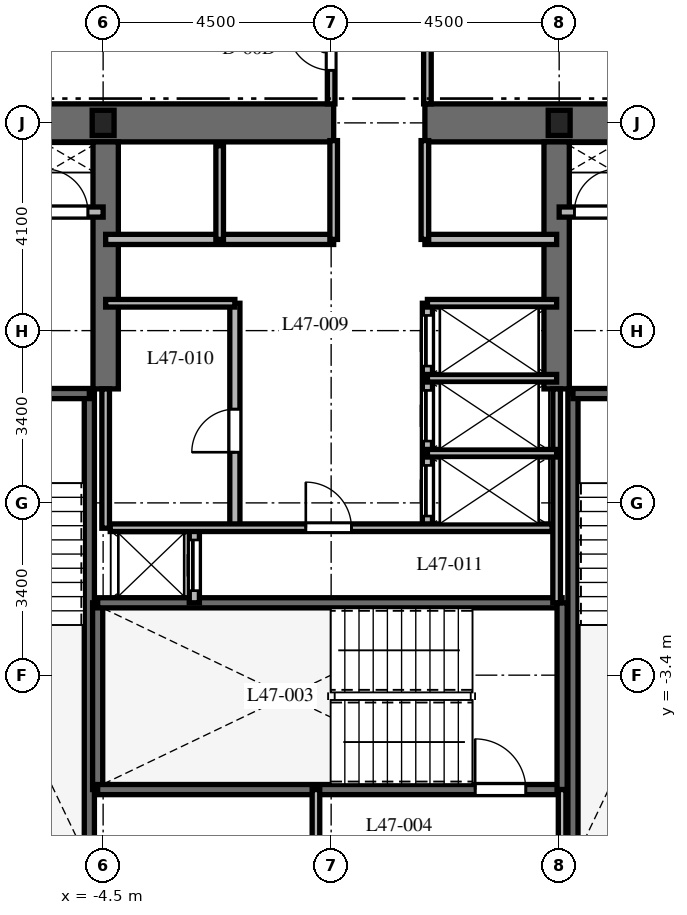
"""IFC4 building model, lengths in metres.
Left out: names, types, materials, properties, quantities, classifications, styles, units other than length and angle.
Written with IfcOpenShell. Run it as: python <this file> out.ifc"""

import sys

from ifc_helpers import new_model, si_unit, direction, frame, frame_2d, origin, origin_2d, place, context, subcontext, project, spatial, rectangle, i_section, extrude, element, fill, save


model = new_model("IFC4")
c1 = context("Model", 3, precision=1e-05, world=origin(), true_north=direction((0.0, 1.0)))
c2 = subcontext(c1, "Body", "Model", "MODEL_VIEW")
j1 = project(units=[si_unit("LENGTHUNIT", "METRE"), si_unit("PLANEANGLEUNIT", "RADIAN")], contexts=[c1])
p1 = place(None, origin())
s1 = spatial("IfcSite", under=j1, at=p1, CompositionType="ELEMENT")
p2 = place(p1, origin())
s2 = spatial("IfcBuilding", under=s1, at=p2, CompositionType="ELEMENT")
p3 = place(p2, frame((0.0, 0.0, 190.4)))
s3 = spatial("IfcBuildingStorey", under=s2, at=p3, CompositionType="ELEMENT", Elevation=190.4)
p4 = place(p3, frame((-9.375, 7.5, 0.0), z_axis=(0.0, 0.0, 1.0), x_axis=(1.0, 0.0, 0.0)))
e1 = element("IfcWall", 1, at=p4, inside=s3, PredefinedType="SHEAR", context=c2, shape_type="SweptSolid", body=[
    extrude(rectangle(XDim=9.425, YDim=0.75, at=frame_2d((4.712, 0.0))), origin(), (0.0, 0.0, 1.0), 3.7),
])
p5 = place(p3, frame((1.85, 7.5, 0.0), z_axis=(0.0, 0.0, 1.0), x_axis=(1.0, 0.0, 0.0)))
e2 = element("IfcWall", 2, at=p5, inside=s3, PredefinedType="SHEAR", context=c2, shape_type="SweptSolid", body=[
    extrude(rectangle(XDim=7.525, YDim=0.75, at=frame_2d((3.762, 0.0))), origin(), (0.0, 0.0, 1.0), 3.7),
])
for number, where, z_axis, x_axis in (
    (3, (-4.45, 2.25, 0.0), (0.0, 0.0, 1.0), (0.0, 1.0, 0.0)),
    (4, (4.45, 2.25, 0.0), (0.0, 0.0, 1.0), (0.0, 1.0, 0.0)),
):
    element("IfcWall", number, at=place(p3, frame(where, z_axis=z_axis, x_axis=x_axis)), inside=s3, PredefinedType="SHEAR", context=c2, shape_type="SweptSolid", body=[
        extrude(rectangle(XDim=4.875, YDim=0.5, at=frame_2d((2.438, 0.0))), origin(), (0.0, 0.0, 1.0), 3.7),
    ])
p6 = place(p3, frame((-4.772, -6.985, 0.0), z_axis=(0.0, 0.0, 1.0), x_axis=(0.0, 1.0, 0.0)))
e5 = element("IfcWall", 5, at=p6, inside=s3, PredefinedType="SHEAR", context=c2, shape_type="SweptSolid", body=[
    extrude(rectangle(XDim=9.143, YDim=0.2, at=frame_2d((4.572, 0.0))), origin(), (0.0, 0.0, 1.0), 3.7),
])
p7 = place(p3, frame((-8.458, 2.158, 0.0), z_axis=(0.0, 0.0, 1.0), x_axis=(1.0, 0.0, 0.0)))
e6 = element("IfcWall", 6, at=p7, inside=s3, PredefinedType="SHEAR", context=c2, shape_type="SweptSolid", body=[
    extrude(rectangle(XDim=3.686, YDim=0.2, at=frame_2d((1.843, 0.0))), origin(), (0.0, 0.0, 1.0), 3.7),
])
p8 = place(p7, frame((1.3, 0.0, 0.0)))
e7 = element("IfcOpeningElement", 7, at=p8, cuts=e6, PredefinedType="OPENING", context=c2, shape_type="SweptSolid", body=[
    extrude(rectangle(XDim=1.0, YDim=2.15, at=frame_2d((0.5, 1.075))), frame((0.0, 0.11, 0.0), z_axis=(0.0, -1.0, 0.0), x_axis=(1.0, 0.0, 0.0)), (0.0, 0.0, 1.0), 0.22),
])
p9 = place(p3, frame((4.772, -6.985, 0.0), z_axis=(0.0, 0.0, 1.0), x_axis=(0.0, 1.0, 0.0)))
e8 = element("IfcWall", 8, at=p9, inside=s3, PredefinedType="SHEAR", context=c2, shape_type="SweptSolid", body=[
    extrude(rectangle(XDim=9.143, YDim=0.2, at=frame_2d((4.572, 0.0))), origin(), (0.0, 0.0, 1.0), 3.7),
])
p10 = place(p3, frame((4.772, 2.158, 0.0), z_axis=(0.0, 0.0, 1.0), x_axis=(1.0, 0.0, 0.0)))
e9 = element("IfcWall", 9, at=p10, inside=s3, PredefinedType="SHEAR", context=c2, shape_type="SweptSolid", body=[
    extrude(rectangle(XDim=3.686, YDim=0.2, at=frame_2d((1.843, 0.0))), origin(), (0.0, 0.0, 1.0), 3.7),
])
p11 = place(p10, frame((1.35, 0.0, 0.0)))
e10 = element("IfcOpeningElement", 10, at=p11, cuts=e9, PredefinedType="OPENING", context=c2, shape_type="SweptSolid", body=[
    extrude(rectangle(XDim=1.0, YDim=2.15, at=frame_2d((0.5, 1.075))), frame((0.0, 0.11, 0.0), z_axis=(0.0, -1.0, 0.0), x_axis=(1.0, 0.0, 0.0)), (0.0, 0.0, 1.0), 0.22),
])
p12 = place(p3, frame((-4.608, -5.658, 0.0), z_axis=(0.0, 0.0, 1.0), x_axis=(0.0, 1.0, 0.0)))
e11 = element("IfcWall", 11, at=p12, inside=s3, PredefinedType="SHEAR", context=c2, shape_type="SweptSolid", body=[
    extrude(rectangle(XDim=3.686, YDim=0.2, at=frame_2d((1.843, 0.0))), origin(), (0.0, 0.0, 1.0), 3.7),
])
p13 = place(p3, frame((-4.608, -5.658, 0.0), z_axis=(0.0, 0.0, 1.0), x_axis=(1.0, 0.0, 0.0)))
e12 = element("IfcWall", 12, at=p13, inside=s3, PredefinedType="SHEAR", context=c2, shape_type="SweptSolid", body=[
    extrude(rectangle(XDim=9.166, YDim=0.2, at=frame_2d((4.583, 0.0))), origin(), (0.0, 0.0, 1.0), 3.7),
])
p14 = place(p13, frame((7.45, 0.0, 0.0)))
e13 = element("IfcOpeningElement", 13, at=p14, cuts=e12, PredefinedType="OPENING", context=c2, shape_type="SweptSolid", body=[
    extrude(rectangle(XDim=1.0, YDim=2.15, at=frame_2d((0.5, 1.075))), frame((0.0, 0.11, 0.0), z_axis=(0.0, -1.0, 0.0), x_axis=(1.0, 0.0, 0.0)), (0.0, 0.0, 1.0), 0.22),
])
p15 = place(p3, frame((-4.608, -1.972, 0.0), z_axis=(0.0, 0.0, 1.0), x_axis=(1.0, 0.0, 0.0)))
e14 = element("IfcWall", 14, at=p15, inside=s3, PredefinedType="SHEAR", context=c2, shape_type="SweptSolid", body=[
    extrude(rectangle(XDim=9.166, YDim=0.2, at=frame_2d((4.583, 0.0))), origin(), (0.0, 0.0, 1.0), 3.7),
])
p16 = place(p3, frame((4.558, -5.658, 0.0), z_axis=(0.0, 0.0, 1.0), x_axis=(0.0, 1.0, 0.0)))
e15 = element("IfcWall", 15, at=p16, inside=s3, PredefinedType="SHEAR", context=c2, shape_type="SweptSolid", body=[
    extrude(rectangle(XDim=3.686, YDim=0.2, at=frame_2d((1.843, 0.0))), origin(), (0.0, 0.0, 1.0), 3.7),
])
for number, where, z_axis, x_axis in (
    (16, (4.5, 7.5, 0.0), (0.0, 0.0, 1.0), (1.0, 0.0, 0.0)),
    (17, (-4.5, 7.5, 0.0), (0.0, 0.0, 1.0), (1.0, 0.0, 0.0)),
):
    element("IfcColumn", number, at=place(p3, frame(where, z_axis=z_axis, x_axis=x_axis)), inside=s3, PredefinedType="COLUMN", context=c2, shape_type="SweptSolid", body=[
        extrude(i_section(OverallWidth=0.432, OverallDepth=0.498, WebThickness=0.056, FlangeThickness=0.089, at=origin_2d()), origin(), (0.0, 0.0, 1.0), 3.7),
    ])
for number, where, z_axis, x_axis in (
    (18, (-0.3, -7.02, 0.0), (0.0, 0.0, 1.0), (0.0, 1.0, 0.0)),
    (19, (4.558, -7.02, 0.0), (0.0, 0.0, 1.0), (0.0, 1.0, 0.0)),
):
    element("IfcWall", number, at=place(p3, frame(where, z_axis=z_axis, x_axis=x_axis)), inside=s3, PredefinedType="PARTITIONING", context=c2, shape_type="SweptSolid", body=[
        extrude(rectangle(XDim=1.362, YDim=0.15, at=frame_2d((0.681, 0.0))), origin(), (0.0, 0.0, 1.0), 3.4),
    ])
p17 = place(p3, frame((-8.55, 5.74, 0.0), z_axis=(0.0, 0.0, 1.0), x_axis=(1.0, 0.0, 0.0)))
e20 = element("IfcWall", 20, at=p17, inside=s3, PredefinedType="PARTITIONING", context=c2, shape_type="SweptSolid", body=[
    extrude(rectangle(XDim=4.05, YDim=0.2, at=frame_2d((2.025, 0.0))), origin(), (0.0, 0.0, 1.0), 3.4),
])
p18 = place(p17, frame((0.75, 0.0, 0.0)))
e21 = element("IfcOpeningElement", 21, at=p18, cuts=e20, PredefinedType="OPENING", context=c2, shape_type="SweptSolid", body=[
    extrude(rectangle(XDim=1.1, YDim=2.2, at=frame_2d((0.55, 1.1))), frame((0.0, 0.11, 0.0), z_axis=(0.0, -1.0, 0.0), x_axis=(1.0, 0.0, 0.0)), (0.0, 0.0, 1.0), 0.22),
])
p19 = place(p17, frame((2.9, 0.0, 0.0)))
e22 = element("IfcOpeningElement", 22, at=p19, cuts=e20, PredefinedType="OPENING", context=c2, shape_type="SweptSolid", body=[
    extrude(rectangle(XDim=0.85, YDim=2.03, at=frame_2d((0.425, 1.015))), frame((0.0, 0.11, 0.0), z_axis=(0.0, -1.0, 0.0), x_axis=(1.0, 0.0, 0.0)), (0.0, 0.0, 1.0), 0.22),
])
p20 = place(p3, frame((4.5, 5.74, 0.0), z_axis=(0.0, 0.0, 1.0), x_axis=(1.0, 0.0, 0.0)))
e23 = element("IfcWall", 23, at=p20, inside=s3, PredefinedType="PARTITIONING", context=c2, shape_type="SweptSolid", body=[
    extrude(rectangle(XDim=4.05, YDim=0.2, at=frame_2d((2.025, 0.0))), origin(), (0.0, 0.0, 1.0), 3.4),
])
p21 = place(p20, frame((0.3, 0.0, 0.0)))
e24 = element("IfcOpeningElement", 24, at=p21, cuts=e23, PredefinedType="OPENING", context=c2, shape_type="SweptSolid", body=[
    extrude(rectangle(XDim=0.85, YDim=2.03, at=frame_2d((0.425, 1.015))), frame((0.0, 0.11, 0.0), z_axis=(0.0, -1.0, 0.0), x_axis=(1.0, 0.0, 0.0)), (0.0, 0.0, 1.0), 0.22),
])
p22 = place(p20, frame((2.15, 0.0, 0.0)))
e25 = element("IfcOpeningElement", 25, at=p22, cuts=e23, PredefinedType="OPENING", context=c2, shape_type="SweptSolid", body=[
    extrude(rectangle(XDim=1.1, YDim=2.2, at=frame_2d((0.55, 1.1))), frame((0.0, 0.11, 0.0), z_axis=(0.0, -1.0, 0.0), x_axis=(1.0, 0.0, 0.0)), (0.0, 0.0, 1.0), 0.22),
])
p23 = place(p3, frame((-2.7, -1.972, 0.0), z_axis=(0.0, 0.0, 1.0), x_axis=(0.0, 1.0, 0.0)))
e26 = element("IfcWall", 26, at=p23, inside=s3, PredefinedType="PARTITIONING", context=c2, shape_type="SweptSolid", body=[
    extrude(rectangle(XDim=1.472, YDim=0.2, at=frame_2d((0.736, 0.0))), origin(), (0.0, 0.0, 1.0), 3.4),
])
p24 = place(p23, frame((0.24, 0.0, 0.0)))
e27 = element("IfcOpeningElement", 27, at=p24, cuts=e26, PredefinedType="OPENING", context=c2, shape_type="SweptSolid", body=[
    extrude(rectangle(XDim=1.0, YDim=2.2, at=frame_2d((0.5, 1.1))), frame((0.0, 0.11, 0.0), z_axis=(0.0, -1.0, 0.0), x_axis=(1.0, 0.0, 0.0)), (0.0, 0.0, 1.0), 0.22),
])
p25 = place(p3, frame((-4.45, 5.2, 0.0), z_axis=(0.0, 0.0, 1.0), x_axis=(1.0, 0.0, 0.0)))
e28 = element("IfcWall", 28, at=p25, inside=s3, PredefinedType="PARTITIONING", context=c2, shape_type="SweptSolid", body=[
    extrude(rectangle(XDim=4.5, YDim=0.2, at=frame_2d((2.25, 0.0))), origin(), (0.0, 0.0, 1.0), 3.4),
])
p26 = place(p3, frame((1.85, 5.2, 0.0), z_axis=(0.0, 0.0, 1.0), x_axis=(1.0, 0.0, 0.0)))
e29 = element("IfcWall", 29, at=p26, inside=s3, PredefinedType="PARTITIONING", context=c2, shape_type="SweptSolid", body=[
    extrude(rectangle(XDim=2.6, YDim=0.2, at=frame_2d((1.3, 0.0))), origin(), (0.0, 0.0, 1.0), 3.4),
])
p27 = place(p3, frame((-2.2, 5.2, 0.0), z_axis=(0.0, 0.0, 1.0), x_axis=(0.0, 1.0, 0.0)))
e30 = element("IfcWall", 30, at=p27, inside=s3, PredefinedType="PARTITIONING", context=c2, shape_type="SweptSolid", body=[
    extrude(rectangle(XDim=1.85, YDim=0.15, at=frame_2d((0.925, 0.0))), origin(), (0.0, 0.0, 1.0), 3.4),
])
for number, where, z_axis, x_axis in (
    (31, (0.05, 5.2, 0.0), (0.0, 0.0, 1.0), (0.0, 1.0, 0.0)),
    (32, (1.85, 5.2, 0.0), (0.0, 0.0, 1.0), (0.0, 1.0, 0.0)),
):
    element("IfcWall", number, at=place(p3, frame(where, z_axis=z_axis, x_axis=x_axis)), inside=s3, PredefinedType="PARTITIONING", context=c2, shape_type="SweptSolid", body=[
        extrude(rectangle(XDim=1.95, YDim=0.15, at=frame_2d((0.975, 0.0))), origin(), (0.0, 0.0, 1.0), 3.4),
    ])
p28 = place(p3, frame((-4.45, -0.5, 0.0), z_axis=(0.0, 0.0, 1.0), x_axis=(0.0, 1.0, 0.0)))
e33 = element("IfcWall", 33, at=p28, inside=s3, PredefinedType="PARTITIONING", context=c2, shape_type="SweptSolid", body=[
    extrude(rectangle(XDim=2.75, YDim=0.15, at=frame_2d((1.375, 0.0))), origin(), (0.0, 0.0, 1.0), 3.4),
])
p29 = place(p3, frame((4.45, -1.972, 0.0), z_axis=(0.0, 0.0, 1.0), x_axis=(0.0, 1.0, 0.0)))
e34 = element("IfcWall", 34, at=p29, inside=s3, PredefinedType="PARTITIONING", context=c2, shape_type="SweptSolid", body=[
    extrude(rectangle(XDim=4.222, YDim=0.15, at=frame_2d((2.111, 0.0))), origin(), (0.0, 0.0, 1.0), 3.4),
])
p30 = place(p3, frame((-1.9, -0.5, 0.0), z_axis=(0.0, 0.0, 1.0), x_axis=(0.0, 1.0, 0.0)))
e35 = element("IfcWall", 35, at=p30, inside=s3, PredefinedType="PARTITIONING", context=c2, shape_type="SweptSolid", body=[
    extrude(rectangle(XDim=4.44, YDim=0.2, at=frame_2d((2.22, 0.0))), origin(), (0.0, 0.0, 1.0), 3.4),
])
p31 = place(p30, frame((1.5, 0.0, 0.0)))
e36 = element("IfcOpeningElement", 36, at=p31, cuts=e35, PredefinedType="OPENING", context=c2, shape_type="SweptSolid", body=[
    extrude(rectangle(XDim=0.85, YDim=2.03, at=frame_2d((0.425, 1.015))), frame((0.0, 0.11, 0.0), z_axis=(0.0, -1.0, 0.0), x_axis=(1.0, 0.0, 0.0)), (0.0, 0.0, 1.0), 0.22),
])
p32 = place(p3, frame((-4.45, 3.94, 0.0), z_axis=(0.0, 0.0, 1.0), x_axis=(1.0, 0.0, 0.0)))
e37 = element("IfcWall", 37, at=p32, inside=s3, PredefinedType="PARTITIONING", context=c2, shape_type="SweptSolid", body=[
    extrude(rectangle(XDim=2.55, YDim=0.15, at=frame_2d((1.275, 0.0))), origin(), (0.0, 0.0, 1.0), 3.4),
])
p33 = place(p3, frame((1.9, -0.5, 0.0), z_axis=(0.0, 0.0, 1.0), x_axis=(0.0, 1.0, 0.0)))
e38 = element("IfcWall", 38, at=p33, inside=s3, PredefinedType="PARTITIONING", context=c2, shape_type="SweptSolid", body=[
    extrude(rectangle(XDim=4.44, YDim=0.2, at=frame_2d((2.22, 0.0))), origin(), (0.0, 0.0, 1.0), 3.4),
])
p34 = place(p33, frame((0.24, 0.0, 0.0)))
e39 = element("IfcOpeningElement", 39, at=p34, cuts=e38, PredefinedType="OPENING", context=c2, shape_type="SweptSolid", body=[
    extrude(rectangle(XDim=1.0, YDim=2.2, at=frame_2d((0.5, 1.1))), frame((0.0, 0.11, 0.0), z_axis=(0.0, -1.0, 0.0), x_axis=(1.0, 0.0, 0.0)), (0.0, 0.0, 1.0), 0.22),
])
p35 = place(p33, frame((1.72, 0.0, 0.0)))
e40 = element("IfcOpeningElement", 40, at=p35, cuts=e38, PredefinedType="OPENING", context=c2, shape_type="SweptSolid", body=[
    extrude(rectangle(XDim=1.0, YDim=2.2, at=frame_2d((0.5, 1.1))), frame((0.0, 0.11, 0.0), z_axis=(0.0, -1.0, 0.0), x_axis=(1.0, 0.0, 0.0)), (0.0, 0.0, 1.0), 0.22),
])
p36 = place(p33, frame((3.2, 0.0, 0.0)))
e41 = element("IfcOpeningElement", 41, at=p36, cuts=e38, PredefinedType="OPENING", context=c2, shape_type="SweptSolid", body=[
    extrude(rectangle(XDim=1.0, YDim=2.2, at=frame_2d((0.5, 1.1))), frame((0.0, 0.11, 0.0), z_axis=(0.0, -1.0, 0.0), x_axis=(1.0, 0.0, 0.0)), (0.0, 0.0, 1.0), 0.22),
])
for number, where, z_axis, x_axis in (
    (42, (1.9, 3.94, 0.0), (0.0, 0.0, 1.0), (1.0, 0.0, 0.0)),
    (43, (1.9, 0.98, 0.0), (0.0, 0.0, 1.0), (1.0, 0.0, 0.0)),
    (44, (1.9, 2.46, 0.0), (0.0, 0.0, 1.0), (1.0, 0.0, 0.0)),
):
    element("IfcWall", number, at=place(p3, frame(where, z_axis=z_axis, x_axis=x_axis)), inside=s3, PredefinedType="PARTITIONING", context=c2, shape_type="SweptSolid", body=[
        extrude(rectangle(XDim=2.55, YDim=0.15, at=frame_2d((1.275, 0.0))), origin(), (0.0, 0.0, 1.0), 3.4),
    ])
p37 = place(p3, frame((-4.36, -0.49, 0.0), z_axis=(0.0, 0.0, 1.0), x_axis=(1.0, 0.0, 0.0)))
e45 = element("IfcWall", 45, at=p37, inside=s3, PredefinedType="PARTITIONING", context=c2, shape_type="SweptSolid", body=[
    extrude(rectangle(XDim=8.72, YDim=0.15, at=frame_2d((4.36, 0.0))), origin(), (0.0, 0.0, 1.0), 3.4),
])
p38 = place(p37, frame((3.86, 0.0, 0.0)))
e46 = element("IfcOpeningElement", 46, at=p38, cuts=e45, PredefinedType="OPENING", context=c2, shape_type="SweptSolid", body=[
    extrude(rectangle(XDim=0.9, YDim=2.03, at=frame_2d((0.45, 1.015))), frame((0.0, 0.085, 0.0), z_axis=(0.0, -1.0, 0.0), x_axis=(1.0, 0.0, 0.0)), (0.0, 0.0, 1.0), 0.17),
])
p39 = place(p3, frame((1.9, 10.05, 0.0), z_axis=(0.0, 0.0, 1.0), x_axis=(0.0, -1.0, 0.0)))
e47 = element("IfcWall", 47, at=p39, inside=s3, PredefinedType="PARTITIONING", context=c2, shape_type="SweptSolid", body=[
    extrude(rectangle(XDim=2.175, YDim=0.15, at=frame_2d((1.087, 0.0))), origin(), (0.0, 0.0, 1.0), 3.4),
])
p40 = place(p3, frame((0.0, 7.875, 0.0), z_axis=(0.0, 0.0, 1.0), x_axis=(0.0, 1.0, 0.0)))
e48 = element("IfcWall", 48, at=p40, inside=s3, PredefinedType="PARTITIONING", context=c2, shape_type="SweptSolid", body=[
    extrude(rectangle(XDim=2.175, YDim=0.15, at=frame_2d((1.087, 0.0))), origin(), (0.0, 0.0, 1.0), 3.4),
])
p41 = place(p40, frame((0.663, 0.0, 0.0)))
e49 = element("IfcOpeningElement", 49, at=p41, cuts=e48, PredefinedType="OPENING", context=c2, shape_type="SweptSolid", body=[
    extrude(rectangle(XDim=0.85, YDim=2.03, at=frame_2d((0.425, 1.015))), frame((0.0, 0.085, 0.0), z_axis=(0.0, -1.0, 0.0), x_axis=(1.0, 0.0, 0.0)), (0.0, 0.0, 1.0), 0.17),
])
p42 = place(p14, origin())
e50 = element("IfcDoor", 50, at=p42, inside=s3, OperationType="SINGLE_SWING_LEFT", PredefinedType="DOOR", context=c2, shape_type="SweptSolid", body=[
    extrude(rectangle(XDim=1.0, YDim=2.15, at=frame_2d((0.5, 1.075))), frame((0.0, 0.025, 0.0), z_axis=(0.0, -1.0, 0.0), x_axis=(1.0, 0.0, 0.0)), (0.0, 0.0, 1.0), 0.05),
])
fill(e13, e50)
p43 = place(p19, origin())
e51 = element("IfcDoor", 51, at=p43, inside=s3, OperationType="SINGLE_SWING_LEFT", PredefinedType="DOOR", context=c2, shape_type="SweptSolid", body=[
    extrude(rectangle(XDim=0.85, YDim=2.03, at=frame_2d((0.425, 1.015))), frame((0.0, 0.025, 0.0), z_axis=(0.0, -1.0, 0.0), x_axis=(1.0, 0.0, 0.0)), (0.0, 0.0, 1.0), 0.05),
])
fill(e22, e51)
p44 = place(p21, origin())
e52 = element("IfcDoor", 52, at=p44, inside=s3, OperationType="SINGLE_SWING_RIGHT", PredefinedType="DOOR", context=c2, shape_type="SweptSolid", body=[
    extrude(rectangle(XDim=0.85, YDim=2.03, at=frame_2d((0.425, 1.015))), frame((0.0, 0.025, 0.0), z_axis=(0.0, -1.0, 0.0), x_axis=(1.0, 0.0, 0.0)), (0.0, 0.0, 1.0), 0.05),
])
fill(e24, e52)
p45 = place(p24, origin())
e53 = element("IfcDoor", 53, at=p45, inside=s3, OperationType="SLIDING_TO_LEFT", PredefinedType="DOOR", context=c2, shape_type="SweptSolid", body=[
    extrude(rectangle(XDim=1.0, YDim=2.2, at=frame_2d((0.5, 1.1))), frame((0.0, 0.025, 0.0), z_axis=(0.0, -1.0, 0.0), x_axis=(1.0, 0.0, 0.0)), (0.0, 0.0, 1.0), 0.05),
])
fill(e27, e53)
p46 = place(p31, origin())
e54 = element("IfcDoor", 54, at=p46, inside=s3, OperationType="SINGLE_SWING_LEFT", PredefinedType="DOOR", context=c2, shape_type="SweptSolid", body=[
    extrude(rectangle(XDim=0.85, YDim=2.03, at=frame_2d((0.425, 1.015))), frame((0.0, 0.025, 0.0), z_axis=(0.0, -1.0, 0.0), x_axis=(1.0, 0.0, 0.0)), (0.0, 0.0, 1.0), 0.05),
])
fill(e36, e54)
p47 = place(p34, origin())
e55 = element("IfcDoor", 55, at=p47, inside=s3, OperationType="SLIDING_TO_RIGHT", PredefinedType="DOOR", context=c2, shape_type="SweptSolid", body=[
    extrude(rectangle(XDim=1.0, YDim=2.2, at=frame_2d((0.5, 1.1))), frame((0.0, 0.025, 0.0), z_axis=(0.0, -1.0, 0.0), x_axis=(1.0, 0.0, 0.0)), (0.0, 0.0, 1.0), 0.05),
])
fill(e39, e55)
p48 = place(p35, origin())
e56 = element("IfcDoor", 56, at=p48, inside=s3, OperationType="SLIDING_TO_RIGHT", PredefinedType="DOOR", context=c2, shape_type="SweptSolid", body=[
    extrude(rectangle(XDim=1.0, YDim=2.2, at=frame_2d((0.5, 1.1))), frame((0.0, 0.025, 0.0), z_axis=(0.0, -1.0, 0.0), x_axis=(1.0, 0.0, 0.0)), (0.0, 0.0, 1.0), 0.05),
])
fill(e40, e56)
p49 = place(p36, origin())
e57 = element("IfcDoor", 57, at=p49, inside=s3, OperationType="SLIDING_TO_RIGHT", PredefinedType="DOOR", context=c2, shape_type="SweptSolid", body=[
    extrude(rectangle(XDim=1.0, YDim=2.2, at=frame_2d((0.5, 1.1))), frame((0.0, 0.025, 0.0), z_axis=(0.0, -1.0, 0.0), x_axis=(1.0, 0.0, 0.0)), (0.0, 0.0, 1.0), 0.05),
])
fill(e41, e57)
p50 = place(p38, origin())
e58 = element("IfcDoor", 58, at=p50, inside=s3, OperationType="SINGLE_SWING_LEFT", PredefinedType="DOOR", context=c2, shape_type="SweptSolid", body=[
    extrude(rectangle(XDim=0.9, YDim=2.03, at=frame_2d((0.45, 1.015))), frame((0.0, 0.025, 0.0), z_axis=(0.0, -1.0, 0.0), x_axis=(1.0, 0.0, 0.0)), (0.0, 0.0, 1.0), 0.05),
])
fill(e46, e58)
p51 = place(p41, origin())
e59 = element("IfcDoor", 59, at=p51, inside=s3, OperationType="SINGLE_SWING_RIGHT", PredefinedType="DOOR", context=c2, shape_type="SweptSolid", body=[
    extrude(rectangle(XDim=0.85, YDim=2.03, at=frame_2d((0.425, 1.015))), frame((0.0, 0.025, 0.0), z_axis=(0.0, -1.0, 0.0), x_axis=(1.0, 0.0, 0.0)), (0.0, 0.0, 1.0), 0.05),
])
fill(e49, e59)
save(model, sys.argv[1])
